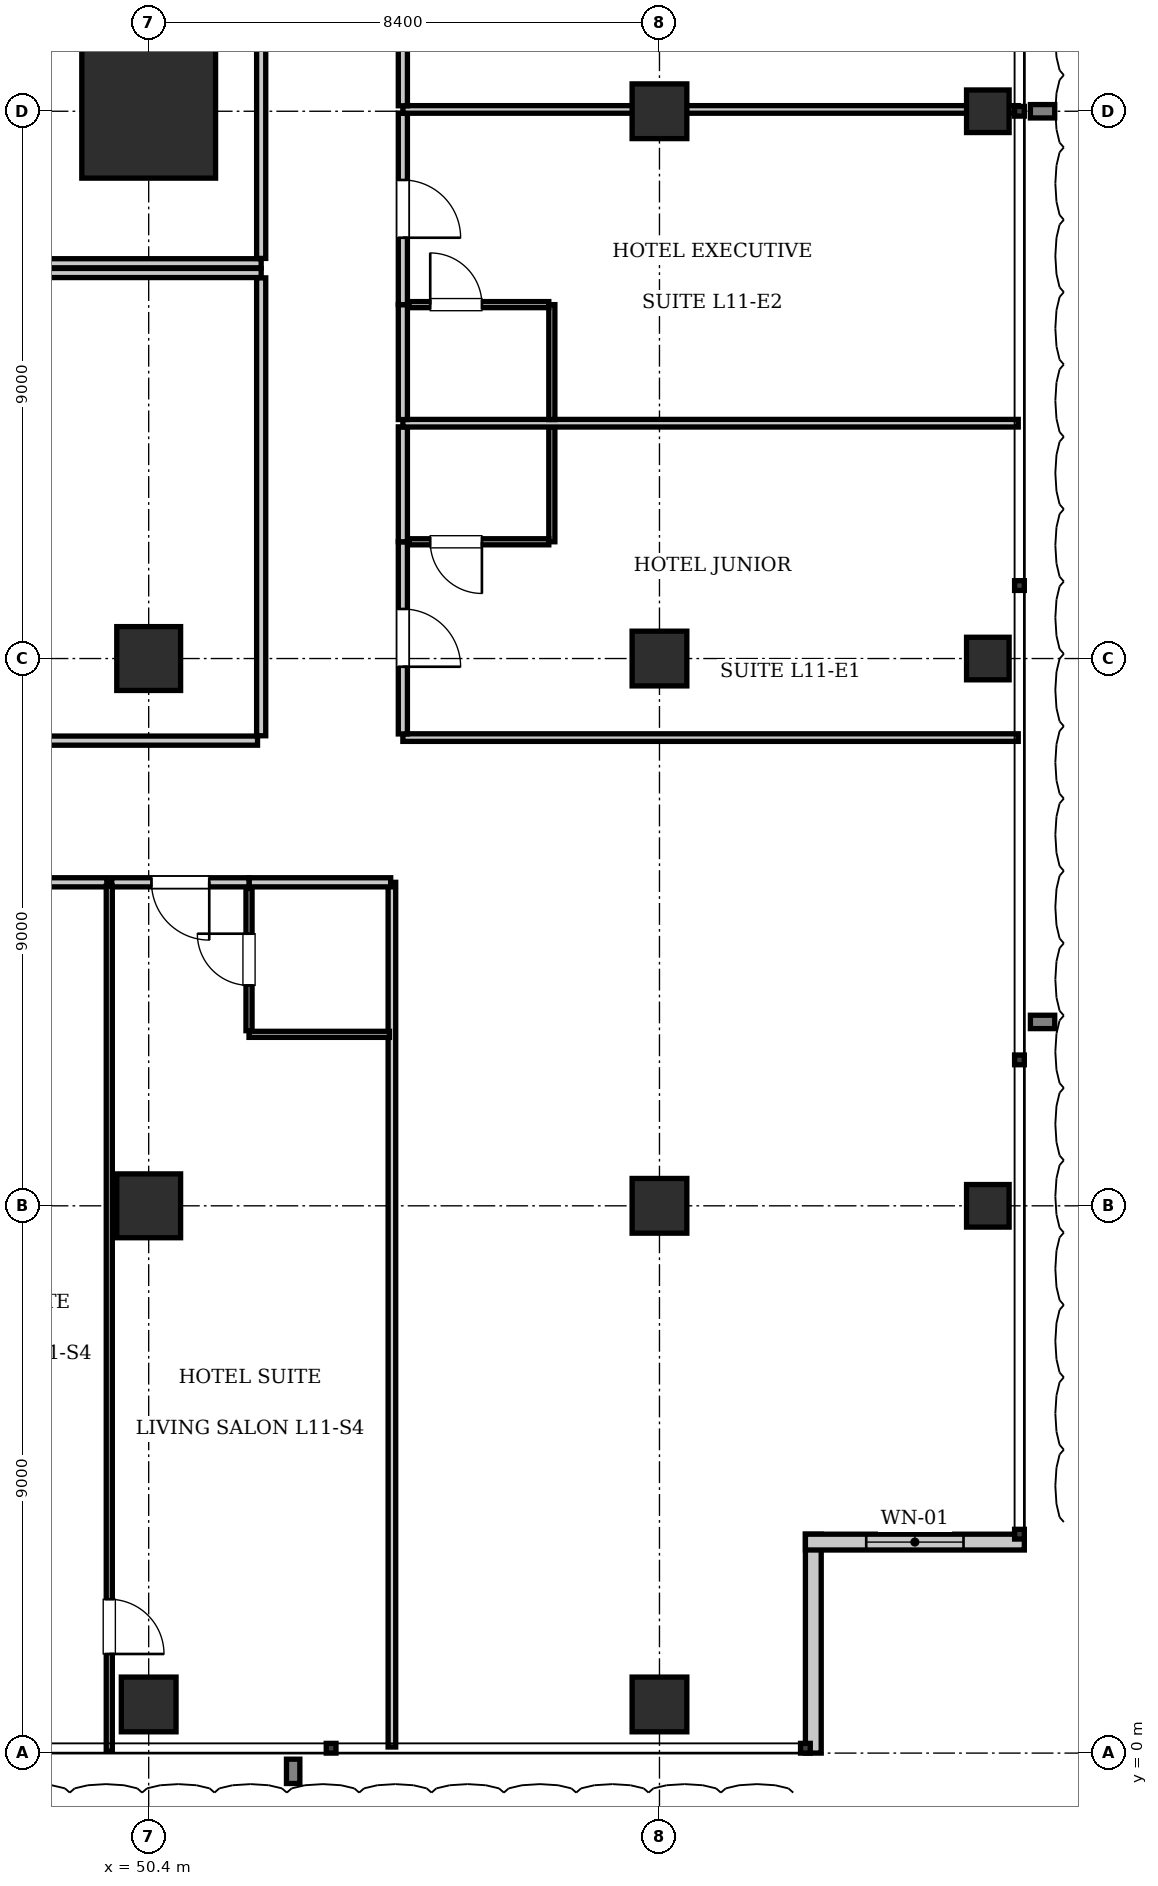
"""IFC4 building model, lengths in metres.
Left out: names, types, materials, properties, quantities, classifications, styles, units other than length and angle.
Written with IfcOpenShell. Run it as: python <this file> out.ifc"""

import sys

from ifc_helpers import new_model, si_unit, direction, frame, frame_2d, origin, origin_2d, place, context, subcontext, project, spatial, rectangle, i_section, extrude, element, fill, save


model = new_model("IFC4")
c1 = context("Model", 3, precision=1e-05, world=origin(), true_north=direction((0.0, 1.0)))
c2 = subcontext(c1, "Body", "Model", "MODEL_VIEW")
j1 = project(units=[si_unit("LENGTHUNIT", "METRE"), si_unit("PLANEANGLEUNIT", "RADIAN")], contexts=[c1])
p1 = place(None, origin())
s1 = spatial("IfcSite", under=j1, at=p1, CompositionType="ELEMENT")
p2 = place(p1, origin())
s2 = spatial("IfcBuilding", under=s1, at=p2, CompositionType="ELEMENT")
p3 = place(p2, frame((0.0, 0.0, 50.05)))
s3 = spatial("IfcBuildingStorey", under=s2, at=p3, CompositionType="ELEMENT", Elevation=50.05)
p4 = place(p3, frame((50.4, 27.0, 0.0), z_axis=(0.0, 0.0, 1.0), x_axis=(1.0, 0.0, 0.0)))
e1 = element("IfcColumn", 1, at=p4, inside=s3, PredefinedType="COLUMN", context=c2, shape_type="SweptSolid", body=[
    extrude(rectangle(XDim=2.2, YDim=2.2, at=origin_2d()), origin(), (0.0, 0.0, 1.0), 3.85),
])
for number, where, z_axis, x_axis in (
    (2, (50.4, 18.0, 0.0), (0.0, 0.0, 1.0), (1.0, 0.0, 0.0)),
    (3, (50.4, 9.0, 0.0), (0.0, 0.0, 1.0), (1.0, 0.0, 0.0)),
):
    element("IfcColumn", number, at=place(p3, frame(where, z_axis=z_axis, x_axis=x_axis)), inside=s3, PredefinedType="COLUMN", context=c2, shape_type="SweptSolid", body=[
        extrude(rectangle(XDim=1.05, YDim=1.05, at=origin_2d()), origin(), (0.0, 0.0, 1.0), 3.85),
    ])
for number, where, z_axis, x_axis in (
    (4, (58.8, 9.0, 0.0), (0.0, 0.0, 1.0), (1.0, 0.0, 0.0)),
    (5, (58.8, 18.0, 0.0), (0.0, 0.0, 1.0), (1.0, 0.0, 0.0)),
    (6, (58.8, 27.0, 0.0), (0.0, 0.0, 1.0), (1.0, 0.0, 0.0)),
    (7, (50.4, 0.8, 0.0), (0.0, 0.0, 1.0), (1.0, 0.0, 0.0)),
    (8, (58.8, 0.8, 0.0), (0.0, 0.0, 1.0), (1.0, 0.0, 0.0)),
):
    element("IfcColumn", number, at=place(p3, frame(where, z_axis=z_axis, x_axis=x_axis)), inside=s3, PredefinedType="COLUMN", context=c2, shape_type="SweptSolid", body=[
        extrude(rectangle(XDim=0.9, YDim=0.9, at=origin_2d()), origin(), (0.0, 0.0, 1.0), 3.85),
    ])
for number, where, z_axis, x_axis in (
    (9, (64.2, 9.0, 0.0), (0.0, 0.0, 1.0), (1.0, 0.0, 0.0)),
    (10, (64.2, 18.0, 0.0), (0.0, 0.0, 1.0), (1.0, 0.0, 0.0)),
    (11, (64.2, 27.0, 0.0), (0.0, 0.0, 1.0), (1.0, 0.0, 0.0)),
):
    element("IfcColumn", number, at=place(p3, frame(where, z_axis=z_axis, x_axis=x_axis)), inside=s3, PredefinedType="COLUMN", context=c2, shape_type="SweptSolid", body=[
        extrude(i_section(OverallWidth=0.7, OverallDepth=0.7, WebThickness=0.028, FlangeThickness=0.044, at=origin_2d()), origin(), (0.0, 0.0, 1.0), 3.85),
    ])
p5 = place(p3, frame((61.33, 3.6, 0.0), z_axis=(0.0, 0.0, 1.0), x_axis=(0.0, -1.0, 0.0)))
e12 = element("IfcWall", 12, at=p5, inside=s3, PredefinedType="SOLIDWALL", context=c2, shape_type="SweptSolid", body=[
    extrude(rectangle(XDim=3.6, YDim=0.26, at=frame_2d((1.8, 0.0))), origin(), (0.0, 0.0, 1.0), 3.61),
])
p6 = place(p3, frame((64.8, 3.47, 0.0), z_axis=(0.0, 0.0, 1.0), x_axis=(-1.0, 0.0, 0.0)))
e13 = element("IfcWall", 13, at=p6, inside=s3, PredefinedType="SOLIDWALL", context=c2, shape_type="SweptSolid", body=[
    extrude(rectangle(XDim=3.6, YDim=0.26, at=frame_2d((1.8, 0.0))), origin(), (0.0, 0.0, 1.0), 3.61),
])
p7 = place(p6, frame((1.0, 0.0, 0.9)))
e14 = element("IfcOpeningElement", 14, at=p7, cuts=e13, PredefinedType="OPENING", context=c2, shape_type="SweptSolid", body=[
    extrude(rectangle(XDim=1.6, YDim=2.1, at=frame_2d((0.8, 1.05))), frame((0.0, 0.14, 0.0), z_axis=(0.0, -1.0, 0.0), x_axis=(1.0, 0.0, 0.0)), (0.0, 0.0, 1.0), 0.28),
])
p8 = place(p3, frame((23.35, 24.5, 0.0), z_axis=(0.0, 0.0, 1.0), x_axis=(1.0, 0.0, 0.0)))
e15 = element("IfcWall", 15, at=p8, inside=s3, PredefinedType="PARTITIONING", context=c2, shape_type="SweptSolid", body=[
    extrude(rectangle(XDim=28.9, YDim=0.15, at=frame_2d((14.45, 0.0))), origin(), (0.0, 0.0, 1.0), 3.61),
])
p9 = place(p3, frame((52.25, 24.58, 0.0), z_axis=(0.0, 0.0, 1.0), x_axis=(0.0, 1.0, 0.0)))
e16 = element("IfcWall", 16, at=p9, inside=s3, PredefinedType="PARTITIONING", context=c2, shape_type="SweptSolid", body=[
    extrude(rectangle(XDim=7.54, YDim=0.15, at=frame_2d((3.77, 0.0))), origin(), (0.0, 0.0, 1.0), 3.61),
])
p10 = place(p3, frame((23.35, 24.34, 0.0), z_axis=(0.0, 0.0, 1.0), x_axis=(1.0, 0.0, 0.0)))
e17 = element("IfcWall", 17, at=p10, inside=s3, PredefinedType="PARTITIONING", context=c2, shape_type="SweptSolid", body=[
    extrude(rectangle(XDim=28.9, YDim=0.15, at=frame_2d((14.45, 0.0))), origin(), (0.0, 0.0, 1.0), 3.61),
])
p11 = place(p3, frame((52.25, 16.73, 0.0), z_axis=(0.0, 0.0, 1.0), x_axis=(0.0, 1.0, 0.0)))
e18 = element("IfcWall", 18, at=p11, inside=s3, PredefinedType="PARTITIONING", context=c2, shape_type="SweptSolid", body=[
    extrude(rectangle(XDim=7.53, YDim=0.15, at=frame_2d((3.765, 0.0))), origin(), (0.0, 0.0, 1.0), 3.61),
])
p12 = place(p3, frame((34.073, 16.65, 0.0), z_axis=(0.0, 0.0, 1.0), x_axis=(1.0, 0.0, 0.0)))
e19 = element("IfcWall", 19, at=p12, inside=s3, PredefinedType="PARTITIONING", context=c2, shape_type="SweptSolid", body=[
    extrude(rectangle(XDim=18.117, YDim=0.15, at=frame_2d((9.059, 0.0))), origin(), (0.0, 0.0, 1.0), 3.61),
])
p13 = place(p12, frame((8.729, 0.0, 0.0)))
e20 = element("IfcOpeningElement", 20, at=p13, cuts=e19, PredefinedType="OPENING", context=c2, shape_type="SweptSolid", body=[
    extrude(rectangle(XDim=0.9, YDim=2.1, at=frame_2d((0.45, 1.05))), frame((0.0, 0.085, 0.0), z_axis=(0.0, -1.0, 0.0), x_axis=(1.0, 0.0, 0.0)), (0.0, 0.0, 1.0), 0.17),
])
p14 = place(p3, frame((54.4, 0.1, 0.0), z_axis=(0.0, 0.0, 1.0), x_axis=(0.0, 1.0, 0.0)))
e21 = element("IfcWall", 21, at=p14, inside=s3, PredefinedType="PARTITIONING", context=c2, shape_type="SweptSolid", body=[
    extrude(rectangle(XDim=14.22, YDim=0.125, at=frame_2d((7.11, 0.0))), origin(), (0.0, 0.0, 1.0), 3.61),
])
p15 = place(p3, frame((52.05, 14.32, 0.0), z_axis=(0.0, 0.0, 1.0), x_axis=(1.0, 0.0, 0.0)))
e22 = element("IfcWall", 22, at=p15, inside=s3, PredefinedType="PARTITIONING", context=c2, shape_type="SweptSolid", body=[
    extrude(rectangle(XDim=2.33, YDim=0.15, at=frame_2d((1.165, 0.0))), origin(), (0.0, 0.0, 1.0), 3.61),
])
p16 = place(p3, frame((52.05, 11.82, 0.0), z_axis=(0.0, 0.0, 1.0), x_axis=(1.0, 0.0, 0.0)))
e23 = element("IfcWall", 23, at=p16, inside=s3, PredefinedType="PARTITIONING", context=c2, shape_type="SweptSolid", body=[
    extrude(rectangle(XDim=2.31, YDim=0.1, at=frame_2d((1.155, 0.0))), origin(), (0.0, 0.0, 1.0), 3.61),
])
p17 = place(p3, frame((52.05, 11.88, 0.0), z_axis=(0.0, 0.0, 1.0), x_axis=(0.0, 1.0, 0.0)))
e24 = element("IfcWall", 24, at=p17, inside=s3, PredefinedType="PARTITIONING", context=c2, shape_type="SweptSolid", body=[
    extrude(rectangle(XDim=2.34, YDim=0.1, at=frame_2d((1.17, 0.0))), origin(), (0.0, 0.0, 1.0), 3.61),
])
p18 = place(p17, frame((0.745, 0.0, 0.0)))
e25 = element("IfcOpeningElement", 25, at=p18, cuts=e24, PredefinedType="OPENING", context=c2, shape_type="SweptSolid", body=[
    extrude(rectangle(XDim=0.85, YDim=2.1, at=frame_2d((0.425, 1.05))), frame((0.0, 0.06, 0.0), z_axis=(0.0, -1.0, 0.0), x_axis=(1.0, 0.0, 0.0)), (0.0, 0.0, 1.0), 0.12),
])
p19 = place(p3, frame((46.12, 14.32, 0.0), z_axis=(0.0, 0.0, 1.0), x_axis=(1.0, 0.0, 0.0)))
e26 = element("IfcWall", 26, at=p19, inside=s3, PredefinedType="PARTITIONING", context=c2, shape_type="SweptSolid", body=[
    extrude(rectangle(XDim=3.592, YDim=0.15, at=frame_2d((1.796, 0.0))), origin(), (0.0, 0.0, 1.0), 3.61),
])
p20 = place(p3, frame((49.792, 14.32, 0.0), z_axis=(0.0, 0.0, 1.0), x_axis=(1.0, 0.0, 0.0)))
e27 = element("IfcWall", 27, at=p20, inside=s3, PredefinedType="PARTITIONING", context=c2, shape_type="SweptSolid", body=[
    extrude(rectangle(XDim=2.258, YDim=0.15, at=frame_2d((1.129, 0.0))), origin(), (0.0, 0.0, 1.0), 3.61),
])
p21 = place(p20, frame((0.654, 0.0, 0.0)))
e28 = element("IfcOpeningElement", 28, at=p21, cuts=e27, PredefinedType="OPENING", context=c2, shape_type="SweptSolid", body=[
    extrude(rectangle(XDim=0.95, YDim=2.15, at=frame_2d((0.475, 1.075))), frame((0.0, 0.085, 0.0), z_axis=(0.0, -1.0, 0.0), x_axis=(1.0, 0.0, 0.0)), (0.0, 0.0, 1.0), 0.17),
])
p22 = place(p3, frame((49.752, 0.03, 0.0), z_axis=(0.0, 0.0, 1.0), x_axis=(0.0, 1.0, 0.0)))
e29 = element("IfcWall", 29, at=p22, inside=s3, PredefinedType="PARTITIONING", context=c2, shape_type="SweptSolid", body=[
    extrude(rectangle(XDim=14.23, YDim=0.1, at=frame_2d((7.115, 0.0))), origin(), (0.0, 0.0, 1.0), 3.61),
])
p23 = place(p22, frame((1.6, 0.0, 0.0)))
e30 = element("IfcOpeningElement", 30, at=p23, cuts=e29, PredefinedType="OPENING", context=c2, shape_type="SweptSolid", body=[
    extrude(rectangle(XDim=0.9, YDim=2.1, at=frame_2d((0.45, 1.05))), frame((0.0, 0.06, 0.0), z_axis=(0.0, -1.0, 0.0), x_axis=(1.0, 0.0, 0.0)), (0.0, 0.0, 1.0), 0.12),
])
p24 = place(p3, frame((54.58, 16.7, 0.0), z_axis=(0.0, 0.0, 1.0), x_axis=(1.0, 0.0, 0.0)))
e31 = element("IfcWall", 31, at=p24, inside=s3, PredefinedType="PARTITIONING", context=c2, shape_type="SweptSolid", body=[
    extrude(rectangle(XDim=10.12, YDim=0.125, at=frame_2d((5.06, 0.0))), origin(), (0.0, 0.0, 1.0), 3.61),
])
p25 = place(p3, frame((54.58, 16.76, 0.0), z_axis=(0.0, 0.0, 1.0), x_axis=(0.0, 1.0, 0.0)))
e32 = element("IfcWall", 32, at=p25, inside=s3, PredefinedType="PARTITIONING", context=c2, shape_type="SweptSolid", body=[
    extrude(rectangle(XDim=3.16, YDim=0.15, at=frame_2d((1.58, 0.0))), origin(), (0.0, 0.0, 1.0), 3.207),
])
p26 = place(p25, frame((1.105, 0.0, 0.0)))
e33 = element("IfcOpeningElement", 33, at=p26, cuts=e32, PredefinedType="OPENING", context=c2, shape_type="SweptSolid", body=[
    extrude(rectangle(XDim=0.95, YDim=2.15, at=frame_2d((0.475, 1.075))), frame((0.0, 0.085, 0.0), z_axis=(0.0, -1.0, 0.0), x_axis=(1.0, 0.0, 0.0)), (0.0, 0.0, 1.0), 0.17),
])
p27 = place(p3, frame((54.58, 19.92, 0.0), z_axis=(0.0, 0.0, 1.0), x_axis=(0.0, 1.0, 0.0)))
e34 = element("IfcWall", 34, at=p27, inside=s3, PredefinedType="PARTITIONING", context=c2, shape_type="SweptSolid", body=[
    extrude(rectangle(XDim=1.89, YDim=0.15, at=frame_2d((0.945, 0.0))), origin(), (0.0, 0.0, 1.0), 3.207),
])
p28 = place(p3, frame((57.03, 19.92, 0.0), z_axis=(0.0, 0.0, 1.0), x_axis=(0.0, 1.0, 0.0)))
e35 = element("IfcWall", 35, at=p28, inside=s3, PredefinedType="PARTITIONING", context=c2, shape_type="SweptSolid", body=[
    extrude(rectangle(XDim=1.89, YDim=0.1, at=frame_2d((0.945, 0.0))), origin(), (0.0, 0.0, 1.0), 3.61),
])
p29 = place(p3, frame((54.68, 19.92, 0.0), z_axis=(0.0, 0.0, 1.0), x_axis=(1.0, 0.0, 0.0)))
e36 = element("IfcWall", 36, at=p29, inside=s3, PredefinedType="PARTITIONING", context=c2, shape_type="SweptSolid", body=[
    extrude(rectangle(XDim=2.3, YDim=0.1, at=frame_2d((1.15, 0.0))), origin(), (0.0, 0.0, 1.0), 3.61),
])
p30 = place(p29, frame((0.35, 0.0, 0.0)))
e37 = element("IfcOpeningElement", 37, at=p30, cuts=e36, PredefinedType="OPENING", context=c2, shape_type="SweptSolid", body=[
    extrude(rectangle(XDim=0.85, YDim=2.1, at=frame_2d((0.425, 1.05))), frame((0.0, 0.06, 0.0), z_axis=(0.0, -1.0, 0.0), x_axis=(1.0, 0.0, 0.0)), (0.0, 0.0, 1.0), 0.12),
])
p31 = place(p3, frame((54.58, 21.87, 0.0), z_axis=(0.0, 0.0, 1.0), x_axis=(1.0, 0.0, 0.0)))
e38 = element("IfcWall", 38, at=p31, inside=s3, PredefinedType="PARTITIONING", context=c2, shape_type="SweptSolid", body=[
    extrude(rectangle(XDim=10.12, YDim=0.125, at=frame_2d((5.06, 0.0))), origin(), (0.0, 0.0, 1.0), 3.61),
])
p32 = place(p3, frame((54.58, 21.93, 0.0), z_axis=(0.0, 0.0, 1.0), x_axis=(0.0, 1.0, 0.0)))
e39 = element("IfcWall", 39, at=p32, inside=s3, PredefinedType="PARTITIONING", context=c2, shape_type="SweptSolid", body=[
    extrude(rectangle(XDim=1.89, YDim=0.15, at=frame_2d((0.945, 0.0))), origin(), (0.0, 0.0, 1.0), 3.207),
])
p33 = place(p3, frame((54.58, 23.82, 0.0), z_axis=(0.0, 0.0, 1.0), x_axis=(0.0, 1.0, 0.0)))
e40 = element("IfcWall", 40, at=p33, inside=s3, PredefinedType="PARTITIONING", context=c2, shape_type="SweptSolid", body=[
    extrude(rectangle(XDim=3.15, YDim=0.15, at=frame_2d((1.575, 0.0))), origin(), (0.0, 0.0, 1.0), 3.207),
])
p34 = place(p33, frame((1.1, 0.0, 0.0)))
e41 = element("IfcOpeningElement", 41, at=p34, cuts=e40, PredefinedType="OPENING", context=c2, shape_type="SweptSolid", body=[
    extrude(rectangle(XDim=0.95, YDim=2.15, at=frame_2d((0.475, 1.075))), frame((0.0, 0.085, 0.0), z_axis=(0.0, -1.0, 0.0), x_axis=(1.0, 0.0, 0.0)), (0.0, 0.0, 1.0), 0.17),
])
p35 = place(p3, frame((57.03, 21.93, 0.0), z_axis=(0.0, 0.0, 1.0), x_axis=(0.0, 1.0, 0.0)))
e42 = element("IfcWall", 42, at=p35, inside=s3, PredefinedType="PARTITIONING", context=c2, shape_type="SweptSolid", body=[
    extrude(rectangle(XDim=1.89, YDim=0.1, at=frame_2d((0.945, 0.0))), origin(), (0.0, 0.0, 1.0), 3.61),
])
p36 = place(p3, frame((54.68, 23.82, 0.0), z_axis=(0.0, 0.0, 1.0), x_axis=(1.0, 0.0, 0.0)))
e43 = element("IfcWall", 43, at=p36, inside=s3, PredefinedType="PARTITIONING", context=c2, shape_type="SweptSolid", body=[
    extrude(rectangle(XDim=2.3, YDim=0.1, at=frame_2d((1.15, 0.0))), origin(), (0.0, 0.0, 1.0), 3.61),
])
p37 = place(p36, frame((0.35, 0.0, 0.0)))
e44 = element("IfcOpeningElement", 44, at=p37, cuts=e43, PredefinedType="OPENING", context=c2, shape_type="SweptSolid", body=[
    extrude(rectangle(XDim=0.85, YDim=2.1, at=frame_2d((0.425, 1.05))), frame((0.0, 0.06, 0.0), z_axis=(0.0, -1.0, 0.0), x_axis=(1.0, 0.0, 0.0)), (0.0, 0.0, 1.0), 0.12),
])
p38 = place(p3, frame((54.58, 27.03, 0.0), z_axis=(0.0, 0.0, 1.0), x_axis=(1.0, 0.0, 0.0)))
e45 = element("IfcWall", 45, at=p38, inside=s3, PredefinedType="PARTITIONING", context=c2, shape_type="SweptSolid", body=[
    extrude(rectangle(XDim=10.12, YDim=0.125, at=frame_2d((5.06, 0.0))), origin(), (0.0, 0.0, 1.0), 2.988),
])
p39 = place(p3, frame((54.58, 27.09, 0.0), z_axis=(0.0, 0.0, 1.0), x_axis=(0.0, 1.0, 0.0)))
e46 = element("IfcWall", 46, at=p39, inside=s3, PredefinedType="PARTITIONING", context=c2, shape_type="SweptSolid", body=[
    extrude(rectangle(XDim=3.16, YDim=0.15, at=frame_2d((1.58, 0.0))), origin(), (0.0, 0.0, 1.0), 3.263),
])
p40 = place(p39, frame((1.105, 0.0, 0.0)))
e47 = element("IfcOpeningElement", 47, at=p40, cuts=e46, PredefinedType="OPENING", context=c2, shape_type="SweptSolid", body=[
    extrude(rectangle(XDim=0.95, YDim=2.15, at=frame_2d((0.475, 1.075))), frame((0.0, 0.085, 0.0), z_axis=(0.0, -1.0, 0.0), x_axis=(1.0, 0.0, 0.0)), (0.0, 0.0, 1.0), 0.17),
])
p41 = place(p7, origin())
e48 = element("IfcWindow", 48, at=p41, inside=s3, PartitioningType="SINGLE_PANEL", PredefinedType="WINDOW", context=c2, shape_type="SweptSolid", body=[
    extrude(rectangle(XDim=1.6, YDim=2.1, at=frame_2d((0.8, 1.05))), frame((0.0, 0.03, 0.0), z_axis=(0.0, -1.0, 0.0), x_axis=(1.0, 0.0, 0.0)), (0.0, 0.0, 1.0), 0.06),
])
fill(e14, e48)
p42 = place(p18, origin())
e49 = element("IfcDoor", 49, at=p42, inside=s3, OperationType="SINGLE_SWING_RIGHT", PredefinedType="DOOR", context=c2, shape_type="SweptSolid", body=[
    extrude(rectangle(XDim=0.85, YDim=2.1, at=frame_2d((0.425, 1.05))), frame((0.0, 0.025, 0.0), z_axis=(0.0, -1.0, 0.0), x_axis=(1.0, 0.0, 0.0)), (0.0, 0.0, 1.0), 0.05),
])
fill(e25, e49)
p43 = place(p21, frame((0.95, 0.0, 0.0), z_axis=(0.0, 0.0, 1.0), x_axis=(-1.0, 0.0, 0.0)))
e50 = element("IfcDoor", 50, at=p43, inside=s3, OperationType="SINGLE_SWING_LEFT", PredefinedType="DOOR", context=c2, shape_type="SweptSolid", body=[
    extrude(rectangle(XDim=0.95, YDim=2.15, at=frame_2d((0.475, 1.075))), frame((0.0, 0.025, 0.0), z_axis=(0.0, -1.0, 0.0), x_axis=(1.0, 0.0, 0.0)), (0.0, 0.0, 1.0), 0.05),
])
fill(e28, e50)
p44 = place(p23, frame((0.9, 0.0, 0.0), z_axis=(0.0, 0.0, 1.0), x_axis=(-1.0, 0.0, 0.0)))
e51 = element("IfcDoor", 51, at=p44, inside=s3, OperationType="SINGLE_SWING_RIGHT", PredefinedType="DOOR", context=c2, shape_type="SweptSolid", body=[
    extrude(rectangle(XDim=0.9, YDim=2.1, at=frame_2d((0.45, 1.05))), frame((0.0, 0.025, 0.0), z_axis=(0.0, -1.0, 0.0), x_axis=(1.0, 0.0, 0.0)), (0.0, 0.0, 1.0), 0.05),
])
fill(e30, e51)
p45 = place(p30, frame((0.85, 0.0, 0.0), z_axis=(0.0, 0.0, 1.0), x_axis=(-1.0, 0.0, 0.0)))
e52 = element("IfcDoor", 52, at=p45, inside=s3, OperationType="SINGLE_SWING_LEFT", PredefinedType="DOOR", context=c2, shape_type="SweptSolid", body=[
    extrude(rectangle(XDim=0.85, YDim=2.1, at=frame_2d((0.425, 1.05))), frame((0.0, 0.025, 0.0), z_axis=(0.0, -1.0, 0.0), x_axis=(1.0, 0.0, 0.0)), (0.0, 0.0, 1.0), 0.05),
])
fill(e37, e52)
p46 = place(p26, frame((0.95, 0.0, 0.0), z_axis=(0.0, 0.0, 1.0), x_axis=(-1.0, 0.0, 0.0)))
e53 = element("IfcDoor", 53, at=p46, inside=s3, OperationType="SINGLE_SWING_RIGHT", PredefinedType="DOOR", context=c2, shape_type="SweptSolid", body=[
    extrude(rectangle(XDim=0.95, YDim=2.15, at=frame_2d((0.475, 1.075))), frame((0.0, 0.025, 0.0), z_axis=(0.0, -1.0, 0.0), x_axis=(1.0, 0.0, 0.0)), (0.0, 0.0, 1.0), 0.05),
])
fill(e33, e53)
p47 = place(p37, origin())
e54 = element("IfcDoor", 54, at=p47, inside=s3, OperationType="SINGLE_SWING_LEFT", PredefinedType="DOOR", context=c2, shape_type="SweptSolid", body=[
    extrude(rectangle(XDim=0.85, YDim=2.1, at=frame_2d((0.425, 1.05))), frame((0.0, 0.025, 0.0), z_axis=(0.0, -1.0, 0.0), x_axis=(1.0, 0.0, 0.0)), (0.0, 0.0, 1.0), 0.05),
])
fill(e44, e54)
p48 = place(p34, frame((0.95, 0.0, 0.0), z_axis=(0.0, 0.0, 1.0), x_axis=(-1.0, 0.0, 0.0)))
e55 = element("IfcDoor", 55, at=p48, inside=s3, OperationType="SINGLE_SWING_RIGHT", PredefinedType="DOOR", context=c2, shape_type="SweptSolid", body=[
    extrude(rectangle(XDim=0.95, YDim=2.15, at=frame_2d((0.475, 1.075))), frame((0.0, 0.025, 0.0), z_axis=(0.0, -1.0, 0.0), x_axis=(1.0, 0.0, 0.0)), (0.0, 0.0, 1.0), 0.05),
])
fill(e41, e55)
save(model, sys.argv[1])
